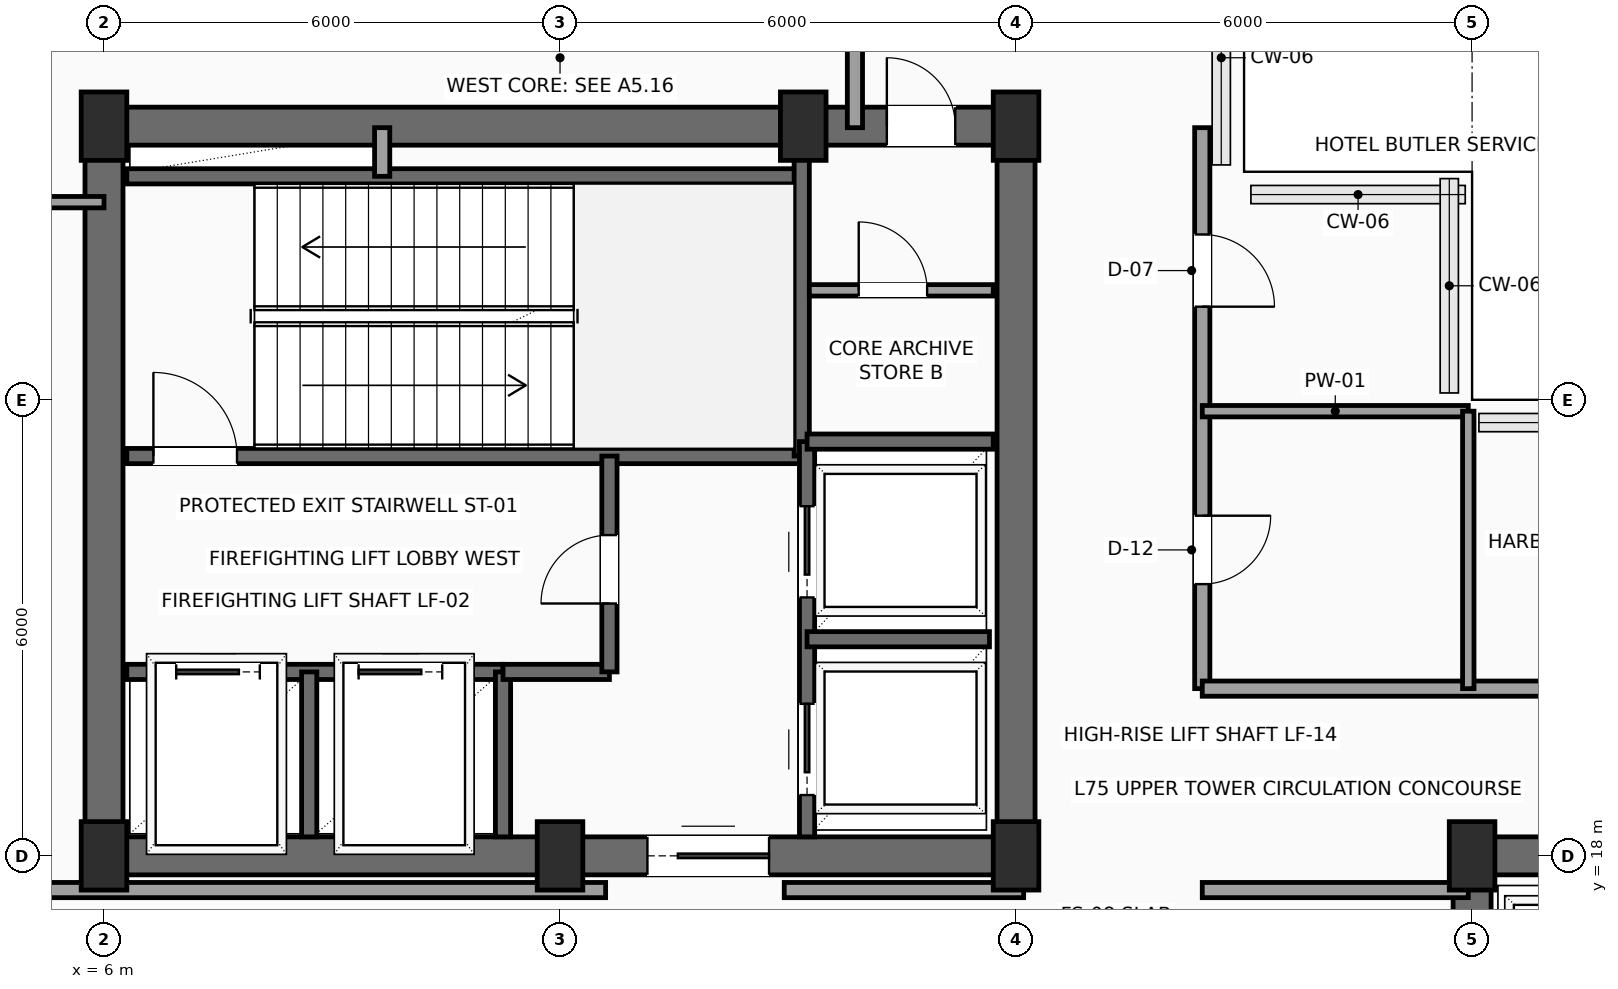
"""IFC4 building model, lengths in metres.
Left out: names, types, materials, properties, quantities, classifications, styles, units other than length and angle.
Written with IfcOpenShell. Run it as: python <this file> out.ifc"""

import sys

from ifc_helpers import new_model, si_unit, direction, frame, frame_2d, origin, origin_2d, place, context, subcontext, project, spatial, rectangle, extrude, element, fill, save


model = new_model("IFC4")
c1 = context("Model", 3, precision=1e-05, world=origin(), true_north=direction((0.0, 1.0)))
c2 = subcontext(c1, "Body", "Model", "MODEL_VIEW")
j1 = project(units=[si_unit("LENGTHUNIT", "METRE"), si_unit("PLANEANGLEUNIT", "RADIAN")], contexts=[c1])
p1 = place(None, origin())
s1 = spatial("IfcSite", under=j1, at=p1, CompositionType="ELEMENT")
p2 = place(p1, origin())
s2 = spatial("IfcBuilding", under=s1, at=p2, CompositionType="ELEMENT")
p3 = place(p2, frame((0.0, 0.0, 296.4)))
s3 = spatial("IfcBuildingStorey", under=s2, at=p3, CompositionType="ELEMENT", Elevation=296.4)
for number, where, z_axis, x_axis in (
    (1, (6.0, 18.0, 0.0), (0.0, 0.0, 1.0), (1.0, 0.0, 0.0)),
    (2, (12.0, 18.0, 0.0), (0.0, 0.0, 1.0), (1.0, 0.0, 0.0)),
    (3, (18.0, 18.0, 0.0), (0.0, 0.0, 1.0), (1.0, 0.0, 0.0)),
    (4, (6.0, 27.6, 0.0), (0.0, 0.0, 1.0), (1.0, 0.0, 0.0)),
    (5, (15.2, 27.6, 0.0), (0.0, 0.0, 1.0), (1.0, 0.0, 0.0)),
    (6, (18.0, 27.6, 0.0), (0.0, 0.0, 1.0), (1.0, 0.0, 0.0)),
    (7, (24.0, 18.0, 0.0), (0.0, 0.0, 1.0), (1.0, 0.0, 0.0)),
):
    element("IfcColumn", number, at=place(p3, frame(where, z_axis=z_axis, x_axis=x_axis)), inside=s3, PredefinedType="COLUMN", context=c2, shape_type="SweptSolid", body=[
        extrude(rectangle(XDim=0.6, YDim=0.9, at=origin_2d()), origin(), (0.0, 0.0, 1.0), 4.5),
    ])
p4 = place(p3, frame((6.0, 18.0, 0.0), z_axis=(0.0, 0.0, 1.0), x_axis=(1.0, 0.0, 0.0)))
e8 = element("IfcWall", 8, at=p4, inside=s3, PredefinedType="SHEAR", context=c2, shape_type="SweptSolid", body=[
    extrude(rectangle(XDim=12.0, YDim=0.5, at=frame_2d((6.0, 0.0))), origin(), (0.0, 0.0, 1.0), 4.225),
])
p5 = place(p4, frame((7.15, 0.0, 0.0)))
e9 = element("IfcOpeningElement", 9, at=p5, cuts=e8, PredefinedType="OPENING", context=c2, shape_type="SweptSolid", body=[
    extrude(rectangle(XDim=1.6, YDim=2.3, at=frame_2d((0.8, 1.15))), frame((0.0, 0.26, 0.0), z_axis=(0.0, -1.0, 0.0), x_axis=(1.0, 0.0, 0.0)), (0.0, 0.0, 1.0), 0.52),
])
p6 = place(p3, frame((6.0, 27.6, 0.0), z_axis=(0.0, 0.0, 1.0), x_axis=(1.0, 0.0, 0.0)))
e10 = element("IfcWall", 10, at=p6, inside=s3, PredefinedType="SHEAR", context=c2, shape_type="SweptSolid", body=[
    extrude(rectangle(XDim=12.0, YDim=0.5, at=frame_2d((6.0, 0.0))), origin(), (0.0, 0.0, 1.0), 4.225),
])
p7 = place(p6, frame((10.3, 0.0, 0.0)))
e11 = element("IfcOpeningElement", 11, at=p7, cuts=e10, PredefinedType="OPENING", context=c2, shape_type="SweptSolid", body=[
    extrude(rectangle(XDim=0.9, YDim=2.15, at=frame_2d((0.45, 1.075))), frame((0.0, 0.26, 0.0), z_axis=(0.0, -1.0, 0.0), x_axis=(1.0, 0.0, 0.0)), (0.0, 0.0, 1.0), 0.52),
])
for number, where, z_axis, x_axis in (
    (12, (6.0, 18.0, 0.0), (0.0, 0.0, 1.0), (0.0, 1.0, 0.0)),
    (13, (18.0, 18.0, 0.0), (0.0, 0.0, 1.0), (0.0, 1.0, 0.0)),
    (14, (24.0, 18.0, 0.0), (0.0, 0.0, 1.0), (1.0, 0.0, 0.0)),
):
    element("IfcWall", number, at=place(p3, frame(where, z_axis=z_axis, x_axis=x_axis)), inside=s3, PredefinedType="SHEAR", context=c2, shape_type="SweptSolid", body=[
        extrude(rectangle(XDim=9.6, YDim=0.5, at=frame_2d((4.8, 0.0))), origin(), (0.0, 0.0, 1.0), 4.225),
    ])
p8 = place(p3, frame((24.0, 6.0, 0.0), z_axis=(0.0, 0.0, 1.0), x_axis=(0.0, 1.0, 0.0)))
e15 = element("IfcWall", 15, at=p8, inside=s3, PredefinedType="SHEAR", context=c2, shape_type="SweptSolid", body=[
    extrude(rectangle(XDim=12.0, YDim=0.5, at=frame_2d((6.0, 0.0))), origin(), (0.0, 0.0, 1.0), 4.225),
])
p9 = place(p8, frame((7.15, 0.0, 0.0)))
e16 = element("IfcOpeningElement", 16, at=p9, cuts=e15, PredefinedType="OPENING", context=c2, shape_type="SweptSolid", body=[
    extrude(rectangle(XDim=1.6, YDim=2.3, at=frame_2d((0.8, 1.15))), frame((0.0, 0.26, 0.0), z_axis=(0.0, -1.0, 0.0), x_axis=(1.0, 0.0, 0.0)), (0.0, 0.0, 1.0), 0.52),
])
p10 = place(p3, frame((6.3, 23.26, 0.0), z_axis=(0.0, 0.0, 1.0), x_axis=(1.0, 0.0, 0.0)))
e17 = element("IfcWall", 17, at=p10, inside=s3, PredefinedType="SHEAR", context=c2, shape_type="SweptSolid", body=[
    extrude(rectangle(XDim=8.88, YDim=0.2, at=frame_2d((4.44, 0.0))), origin(), (0.0, 0.0, 1.0), 4.225),
])
p11 = place(p10, frame((0.35, 0.0, 0.0)))
e18 = element("IfcOpeningElement", 18, at=p11, cuts=e17, PredefinedType="OPENING", context=c2, shape_type="SweptSolid", body=[
    extrude(rectangle(XDim=1.1, YDim=2.2, at=frame_2d((0.55, 1.1))), frame((0.0, 0.11, 0.0), z_axis=(0.0, -1.0, 0.0), x_axis=(1.0, 0.0, 0.0)), (0.0, 0.0, 1.0), 0.22),
])
p12 = place(p3, frame((6.3, 26.94, 0.0), z_axis=(0.0, 0.0, 1.0), x_axis=(1.0, 0.0, 0.0)))
e19 = element("IfcWall", 19, at=p12, inside=s3, PredefinedType="SHEAR", context=c2, shape_type="SweptSolid", body=[
    extrude(rectangle(XDim=8.88, YDim=0.2, at=frame_2d((4.44, 0.0))), origin(), (0.0, 0.0, 1.0), 4.225),
])
p13 = place(p3, frame((15.18, 23.26, 0.0), z_axis=(0.0, 0.0, 1.0), x_axis=(0.0, 1.0, 0.0)))
e20 = element("IfcWall", 20, at=p13, inside=s3, PredefinedType="SHEAR", context=c2, shape_type="SweptSolid", body=[
    extrude(rectangle(XDim=4.04, YDim=0.2, at=frame_2d((2.02, 0.0))), origin(), (0.0, 0.0, 1.0), 4.225),
])
p14 = place(p3, frame((6.3, 20.42, 0.0), z_axis=(0.0, 0.0, 1.0), x_axis=(1.0, 0.0, 0.0)))
e21 = element("IfcWall", 21, at=p14, inside=s3, PredefinedType="SHEAR", context=c2, shape_type="SweptSolid", body=[
    extrude(rectangle(XDim=4.95, YDim=0.2, at=frame_2d((2.475, 0.0))), origin(), (0.0, 0.0, 1.0), 4.225),
])
p15 = place(p14, frame((0.65, 0.0, 0.0)))
e22 = element("IfcOpeningElement", 22, at=p15, cuts=e21, PredefinedType="OPENING", context=c2, shape_type="SweptSolid", body=[
    extrude(rectangle(XDim=1.1, YDim=2.2, at=frame_2d((0.55, 1.1))), frame((0.0, 0.11, 0.0), z_axis=(0.0, -1.0, 0.0), x_axis=(1.0, 0.0, 0.0)), (0.0, 0.0, 1.0), 0.22),
])
p16 = place(p14, frame((3.05, 0.0, 0.0)))
e23 = element("IfcOpeningElement", 23, at=p16, cuts=e21, PredefinedType="OPENING", context=c2, shape_type="SweptSolid", body=[
    extrude(rectangle(XDim=1.1, YDim=2.2, at=frame_2d((0.55, 1.1))), frame((0.0, 0.11, 0.0), z_axis=(0.0, -1.0, 0.0), x_axis=(1.0, 0.0, 0.0)), (0.0, 0.0, 1.0), 0.22),
])
for number, where, z_axis, x_axis in (
    (24, (8.7, 18.25, 0.0), (0.0, 0.0, 1.0), (0.0, 1.0, 0.0)),
    (25, (11.25, 18.25, 0.0), (0.0, 0.0, 1.0), (0.0, 1.0, 0.0)),
):
    element("IfcWall", number, at=place(p3, frame(where, z_axis=z_axis, x_axis=x_axis)), inside=s3, PredefinedType="SHEAR", context=c2, shape_type="SweptSolid", body=[
        extrude(rectangle(XDim=2.17, YDim=0.2, at=frame_2d((1.085, 0.0))), origin(), (0.0, 0.0, 1.0), 4.225),
    ])
p17 = place(p3, frame((11.25, 20.42, 0.0), z_axis=(0.0, 0.0, 1.0), x_axis=(1.0, 0.0, 0.0)))
e26 = element("IfcWall", 26, at=p17, inside=s3, PredefinedType="SHEAR", context=c2, shape_type="SweptSolid", body=[
    extrude(rectangle(XDim=1.4, YDim=0.2, at=frame_2d((0.7, 0.0))), origin(), (0.0, 0.0, 1.0), 4.225),
])
p18 = place(p3, frame((12.65, 20.42, 0.0), z_axis=(0.0, 0.0, 1.0), x_axis=(0.0, 1.0, 0.0)))
e27 = element("IfcWall", 27, at=p18, inside=s3, PredefinedType="SHEAR", context=c2, shape_type="SweptSolid", body=[
    extrude(rectangle(XDim=2.84, YDim=0.2, at=frame_2d((1.42, 0.0))), origin(), (0.0, 0.0, 1.0), 4.225),
])
p19 = place(p18, frame((0.9, 0.0, 0.0)))
e28 = element("IfcOpeningElement", 28, at=p19, cuts=e27, PredefinedType="OPENING", context=c2, shape_type="SweptSolid", body=[
    extrude(rectangle(XDim=0.9, YDim=2.15, at=frame_2d((0.45, 1.075))), frame((0.0, 0.11, 0.0), z_axis=(0.0, -1.0, 0.0), x_axis=(1.0, 0.0, 0.0)), (0.0, 0.0, 1.0), 0.22),
])
p20 = place(p3, frame((9.66, 26.94, 0.0), z_axis=(0.0, 0.0, 1.0), x_axis=(0.0, 1.0, 0.0)))
e29 = element("IfcWall", 29, at=p20, inside=s3, PredefinedType="SOLIDWALL", context=c2, shape_type="SweptSolid", body=[
    extrude(rectangle(XDim=0.64, YDim=0.2, at=frame_2d((0.32, 0.0))), origin(), (0.0, 0.0, 1.0), 4.225),
])
p21 = place(p3, frame((15.25, 18.25, 0.0), z_axis=(0.0, 0.0, 1.0), x_axis=(0.0, 1.0, 0.0)))
e30 = element("IfcWall", 30, at=p21, inside=s3, PredefinedType="SHEAR", context=c2, shape_type="SweptSolid", body=[
    extrude(rectangle(XDim=5.2, YDim=0.2, at=frame_2d((2.6, 0.0))), origin(), (0.0, 0.0, 1.0), 4.225),
])
p22 = place(p21, frame((0.55, 0.0, 0.0)))
e31 = element("IfcOpeningElement", 31, at=p22, cuts=e30, PredefinedType="OPENING", context=c2, shape_type="SweptSolid", body=[
    extrude(rectangle(XDim=1.2, YDim=2.2, at=frame_2d((0.6, 1.1))), frame((0.0, 0.11, 0.0), z_axis=(0.0, -1.0, 0.0), x_axis=(1.0, 0.0, 0.0)), (0.0, 0.0, 1.0), 0.22),
])
p23 = place(p21, frame((3.15, 0.0, 0.0)))
e32 = element("IfcOpeningElement", 32, at=p23, cuts=e30, PredefinedType="OPENING", context=c2, shape_type="SweptSolid", body=[
    extrude(rectangle(XDim=1.2, YDim=2.2, at=frame_2d((0.6, 1.1))), frame((0.0, 0.11, 0.0), z_axis=(0.0, -1.0, 0.0), x_axis=(1.0, 0.0, 0.0)), (0.0, 0.0, 1.0), 0.22),
])
p24 = place(p3, frame((15.25, 20.85, 0.0), z_axis=(0.0, 0.0, 1.0), x_axis=(1.0, 0.0, 0.0)))
e33 = element("IfcWall", 33, at=p24, inside=s3, PredefinedType="SHEAR", context=c2, shape_type="SweptSolid", body=[
    extrude(rectangle(XDim=2.4, YDim=0.2, at=frame_2d((1.2, 0.0))), origin(), (0.0, 0.0, 1.0), 4.225),
])
p25 = place(p3, frame((15.25, 23.45, 0.0), z_axis=(0.0, 0.0, 1.0), x_axis=(1.0, 0.0, 0.0)))
e34 = element("IfcWall", 34, at=p25, inside=s3, PredefinedType="SHEAR", context=c2, shape_type="SweptSolid", body=[
    extrude(rectangle(XDim=2.45, YDim=0.2, at=frame_2d((1.225, 0.0))), origin(), (0.0, 0.0, 1.0), 4.225),
])
p26 = place(p3, frame((15.28, 25.44, 0.0), z_axis=(0.0, 0.0, 1.0), x_axis=(1.0, 0.0, 0.0)))
e35 = element("IfcWall", 35, at=p26, inside=s3, PredefinedType="PARTITIONING", context=c2, shape_type="SweptSolid", body=[
    extrude(rectangle(XDim=2.42, YDim=0.15, at=frame_2d((1.21, 0.0))), origin(), (0.0, 0.0, 1.0), 4.225),
])
p27 = place(p26, frame((0.65, 0.0, 0.0)))
e36 = element("IfcOpeningElement", 36, at=p27, cuts=e35, PredefinedType="OPENING", context=c2, shape_type="SweptSolid", body=[
    extrude(rectangle(XDim=0.9, YDim=2.15, at=frame_2d((0.45, 1.075))), frame((0.0, 0.085, 0.0), z_axis=(0.0, -1.0, 0.0), x_axis=(1.0, 0.0, 0.0)), (0.0, 0.0, 1.0), 0.17),
])
p28 = place(p3, frame((0.3, 17.55, 0.0), z_axis=(0.0, 0.0, 1.0), x_axis=(1.0, 0.0, 0.0)))
e37 = element("IfcWall", 37, at=p28, inside=s3, PredefinedType="SOLIDWALL", context=c2, shape_type="SweptSolid", body=[
    extrude(rectangle(XDim=12.3, YDim=0.2, at=frame_2d((6.15, 0.0))), origin(), (0.0, 0.0, 1.0), 4.225),
])
p29 = place(p28, frame((1.0, 0.0, 0.0)))
e38 = element("IfcOpeningElement", 38, at=p29, cuts=e37, PredefinedType="OPENING", context=c2, shape_type="SweptSolid", body=[
    extrude(rectangle(XDim=0.95, YDim=2.15, at=frame_2d((0.475, 1.075))), frame((0.0, 0.11, 0.0), z_axis=(0.0, -1.0, 0.0), x_axis=(1.0, 0.0, 0.0)), (0.0, 0.0, 1.0), 0.22),
])
p30 = place(p28, frame((3.85, 0.0, 0.0)))
e39 = element("IfcOpeningElement", 39, at=p30, cuts=e37, PredefinedType="OPENING", context=c2, shape_type="SweptSolid", body=[
    extrude(rectangle(XDim=0.9, YDim=2.1, at=frame_2d((0.45, 1.05))), frame((0.0, 0.11, 0.0), z_axis=(0.0, -1.0, 0.0), x_axis=(1.0, 0.0, 0.0)), (0.0, 0.0, 1.0), 0.22),
])
p31 = place(p3, frame((14.95, 17.55, 0.0), z_axis=(0.0, 0.0, 1.0), x_axis=(1.0, 0.0, 0.0)))
e40 = element("IfcWall", 40, at=p31, inside=s3, PredefinedType="SOLIDWALL", context=c2, shape_type="SweptSolid", body=[
    extrude(rectangle(XDim=3.15, YDim=0.2, at=frame_2d((1.575, 0.0))), origin(), (0.0, 0.0, 1.0), 4.225),
])
p32 = place(p3, frame((15.88, 27.58, 0.0), z_axis=(0.0, 0.0, 1.0), x_axis=(0.0, 1.0, 0.0)))
e41 = element("IfcWall", 41, at=p32, inside=s3, PredefinedType="SOLIDWALL", context=c2, shape_type="SweptSolid", body=[
    extrude(rectangle(XDim=2.12, YDim=0.2, at=frame_2d((1.06, 0.0))), origin(), (0.0, 0.0, 1.0), 4.225),
])
p33 = place(p3, frame((20.45, 27.58, 0.0), z_axis=(0.0, 0.0, 1.0), x_axis=(0.0, -1.0, 0.0)))
e42 = element("IfcWall", 42, at=p33, inside=s3, PredefinedType="SOLIDWALL", context=c2, shape_type="SweptSolid", body=[
    extrude(rectangle(XDim=7.38, YDim=0.2, at=frame_2d((3.69, 0.0))), origin(), (0.0, 0.0, 1.0), 4.225),
])
p34 = place(p33, frame((5.105, 0.0, 0.0)))
e43 = element("IfcOpeningElement", 43, at=p34, cuts=e42, PredefinedType="OPENING", context=c2, shape_type="SweptSolid", body=[
    extrude(rectangle(XDim=0.9, YDim=2.1, at=frame_2d((0.45, 1.05))), frame((0.0, 0.11, 0.0), z_axis=(0.0, -1.0, 0.0), x_axis=(1.0, 0.0, 0.0)), (0.0, 0.0, 1.0), 0.22),
])
p35 = place(p33, frame((1.405, 0.0, 0.0)))
e44 = element("IfcOpeningElement", 44, at=p35, cuts=e42, PredefinedType="OPENING", context=c2, shape_type="SweptSolid", body=[
    extrude(rectangle(XDim=0.95, YDim=2.15, at=frame_2d((0.475, 1.075))), frame((0.0, 0.11, 0.0), z_axis=(0.0, -1.0, 0.0), x_axis=(1.0, 0.0, 0.0)), (0.0, 0.0, 1.0), 0.22),
])
p36 = place(p3, frame((20.45, 20.2, 0.0), z_axis=(0.0, 0.0, 1.0), x_axis=(1.0, 0.0, 0.0)))
e45 = element("IfcWall", 45, at=p36, inside=s3, PredefinedType="SOLIDWALL", context=c2, shape_type="SweptSolid", body=[
    extrude(rectangle(XDim=13.13, YDim=0.2, at=frame_2d((6.565, 0.0))), origin(), (0.0, 0.0, 1.0), 4.225),
])
p37 = place(p36, frame((7.85, 0.0, 0.0)))
e46 = element("IfcOpeningElement", 46, at=p37, cuts=e45, PredefinedType="OPENING", context=c2, shape_type="SweptSolid", body=[
    extrude(rectangle(XDim=1.1, YDim=2.25, at=frame_2d((0.55, 1.125))), frame((0.0, 0.11, 0.0), z_axis=(0.0, -1.0, 0.0), x_axis=(1.0, 0.0, 0.0)), (0.0, 0.0, 1.0), 0.22),
])
p38 = place(p3, frame((20.45, 17.55, 0.0), z_axis=(0.0, 0.0, 1.0), x_axis=(1.0, 0.0, 0.0)))
e47 = element("IfcWall", 47, at=p38, inside=s3, PredefinedType="SOLIDWALL", context=c2, shape_type="SweptSolid", body=[
    extrude(rectangle(XDim=3.5, YDim=0.2, at=frame_2d((1.75, 0.0))), origin(), (0.0, 0.0, 1.0), 4.225),
])
p39 = place(p3, frame((20.45, 23.85, 0.0), z_axis=(0.0, 0.0, 1.0), x_axis=(1.0, 0.0, 0.0)))
e48 = element("IfcWall", 48, at=p39, inside=s3, PredefinedType="PARTITIONING", context=c2, shape_type="SweptSolid", body=[
    extrude(rectangle(XDim=3.5, YDim=0.15, at=frame_2d((1.75, 0.0))), origin(), (0.0, 0.0, 1.0), 4.225),
])
p40 = place(p3, frame((23.95, 20.2, 0.0), z_axis=(0.0, 0.0, 1.0), x_axis=(0.0, 1.0, 0.0)))
e49 = element("IfcWall", 49, at=p40, inside=s3, PredefinedType="PARTITIONING", context=c2, shape_type="SweptSolid", body=[
    extrude(rectangle(XDim=3.65, YDim=0.15, at=frame_2d((1.825, 0.0))), origin(), (0.0, 0.0, 1.0), 4.225),
])
p41 = place(p3, frame((3.2, 26.6, 0.0), z_axis=(0.0, 0.0, 1.0), x_axis=(1.0, 0.0, 0.0)))
e50 = element("IfcWall", 50, at=p41, inside=s3, PredefinedType="PARTITIONING", context=c2, shape_type="SweptSolid", body=[
    extrude(rectangle(XDim=2.8, YDim=0.15, at=frame_2d((1.4, 0.0))), origin(), (0.0, 0.0, 1.0), 4.225),
])
p42 = place(p5, origin())
e51 = element("IfcDoor", 51, at=p42, inside=s3, OperationType="DOUBLE_DOOR_SLIDING", PredefinedType="DOOR", context=c2, shape_type="SweptSolid", body=[
    extrude(rectangle(XDim=1.6, YDim=2.3, at=frame_2d((0.8, 1.15))), frame((0.0, 0.025, 0.0), z_axis=(0.0, -1.0, 0.0), x_axis=(1.0, 0.0, 0.0)), (0.0, 0.0, 1.0), 0.05),
])
fill(e9, e51)
p43 = place(p7, origin())
e52 = element("IfcDoor", 52, at=p43, inside=s3, OperationType="SINGLE_SWING_LEFT", PredefinedType="DOOR", context=c2, shape_type="SweptSolid", body=[
    extrude(rectangle(XDim=0.9, YDim=2.15, at=frame_2d((0.45, 1.075))), frame((0.0, 0.025, 0.0), z_axis=(0.0, -1.0, 0.0), x_axis=(1.0, 0.0, 0.0)), (0.0, 0.0, 1.0), 0.05),
])
fill(e11, e52)
p44 = place(p11, origin())
e53 = element("IfcDoor", 53, at=p44, inside=s3, OperationType="SINGLE_SWING_LEFT", PredefinedType="DOOR", context=c2, shape_type="SweptSolid", body=[
    extrude(rectangle(XDim=1.1, YDim=2.2, at=frame_2d((0.55, 1.1))), frame((0.0, 0.025, 0.0), z_axis=(0.0, -1.0, 0.0), x_axis=(1.0, 0.0, 0.0)), (0.0, 0.0, 1.0), 0.05),
])
fill(e18, e53)
p45 = place(p15, origin())
e54 = element("IfcDoor", 54, at=p45, inside=s3, OperationType="SLIDING_TO_LEFT", PredefinedType="DOOR", context=c2, shape_type="SweptSolid", body=[
    extrude(rectangle(XDim=1.1, YDim=2.2, at=frame_2d((0.55, 1.1))), frame((0.0, 0.025, 0.0), z_axis=(0.0, -1.0, 0.0), x_axis=(1.0, 0.0, 0.0)), (0.0, 0.0, 1.0), 0.05),
])
fill(e22, e54)
p46 = place(p16, origin())
e55 = element("IfcDoor", 55, at=p46, inside=s3, OperationType="SLIDING_TO_LEFT", PredefinedType="DOOR", context=c2, shape_type="SweptSolid", body=[
    extrude(rectangle(XDim=1.1, YDim=2.2, at=frame_2d((0.55, 1.1))), frame((0.0, 0.025, 0.0), z_axis=(0.0, -1.0, 0.0), x_axis=(1.0, 0.0, 0.0)), (0.0, 0.0, 1.0), 0.05),
])
fill(e23, e55)
p47 = place(p19, origin())
e56 = element("IfcDoor", 56, at=p47, inside=s3, OperationType="SINGLE_SWING_LEFT", PredefinedType="DOOR", context=c2, shape_type="SweptSolid", body=[
    extrude(rectangle(XDim=0.9, YDim=2.15, at=frame_2d((0.45, 1.075))), frame((0.0, 0.025, 0.0), z_axis=(0.0, -1.0, 0.0), x_axis=(1.0, 0.0, 0.0)), (0.0, 0.0, 1.0), 0.05),
])
fill(e28, e56)
p48 = place(p22, origin())
e57 = element("IfcDoor", 57, at=p48, inside=s3, OperationType="SLIDING_TO_RIGHT", PredefinedType="DOOR", context=c2, shape_type="SweptSolid", body=[
    extrude(rectangle(XDim=1.2, YDim=2.2, at=frame_2d((0.6, 1.1))), frame((0.0, 0.025, 0.0), z_axis=(0.0, -1.0, 0.0), x_axis=(1.0, 0.0, 0.0)), (0.0, 0.0, 1.0), 0.05),
])
fill(e31, e57)
p49 = place(p23, origin())
e58 = element("IfcDoor", 58, at=p49, inside=s3, OperationType="SLIDING_TO_RIGHT", PredefinedType="DOOR", context=c2, shape_type="SweptSolid", body=[
    extrude(rectangle(XDim=1.2, YDim=2.2, at=frame_2d((0.6, 1.1))), frame((0.0, 0.025, 0.0), z_axis=(0.0, -1.0, 0.0), x_axis=(1.0, 0.0, 0.0)), (0.0, 0.0, 1.0), 0.05),
])
fill(e32, e58)
p50 = place(p27, origin())
e59 = element("IfcDoor", 59, at=p50, inside=s3, OperationType="SINGLE_SWING_LEFT", PredefinedType="DOOR", context=c2, shape_type="SweptSolid", body=[
    extrude(rectangle(XDim=0.9, YDim=2.15, at=frame_2d((0.45, 1.075))), frame((0.0, 0.025, 0.0), z_axis=(0.0, -1.0, 0.0), x_axis=(1.0, 0.0, 0.0)), (0.0, 0.0, 1.0), 0.05),
])
fill(e36, e59)
p51 = place(p34, origin())
e60 = element("IfcDoor", 60, at=p51, inside=s3, OperationType="SINGLE_SWING_LEFT", PredefinedType="DOOR", context=c2, shape_type="SweptSolid", body=[
    extrude(rectangle(XDim=0.9, YDim=2.1, at=frame_2d((0.45, 1.05))), frame((0.0, 0.025, 0.0), z_axis=(0.0, -1.0, 0.0), x_axis=(1.0, 0.0, 0.0)), (0.0, 0.0, 1.0), 0.05),
])
fill(e43, e60)
p52 = place(p35, origin())
e61 = element("IfcDoor", 61, at=p52, inside=s3, OperationType="SINGLE_SWING_RIGHT", PredefinedType="DOOR", context=c2, shape_type="SweptSolid", body=[
    extrude(rectangle(XDim=0.95, YDim=2.15, at=frame_2d((0.475, 1.075))), frame((0.0, 0.025, 0.0), z_axis=(0.0, -1.0, 0.0), x_axis=(1.0, 0.0, 0.0)), (0.0, 0.0, 1.0), 0.05),
])
fill(e44, e61)
save(model, sys.argv[1])
